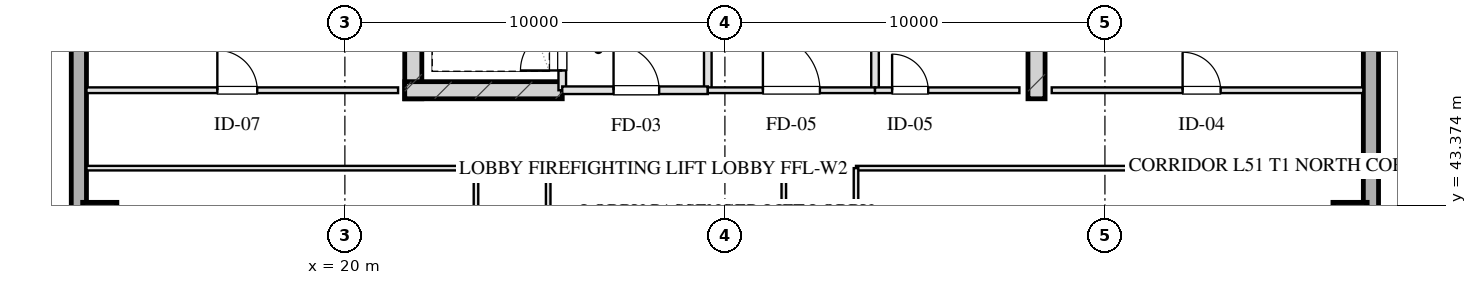
"""IFC4 building model, lengths in metres.
Left out: names, types, materials, properties, quantities, classifications, styles, units other than length and angle.
Written with IfcOpenShell. Run it as: python <this file> out.ifc"""

import sys

from ifc_helpers import new_model, si_unit, direction, frame, frame_2d, origin, origin_2d, place, context, subcontext, project, spatial, rectangle, hollow_rectangle, extrude, element, fill, save


model = new_model("IFC4")
c1 = context("Model", 3, precision=1e-05, world=origin(), true_north=direction((0.0, 1.0)))
c2 = subcontext(c1, "Body", "Model", "MODEL_VIEW")
j1 = project(units=[si_unit("LENGTHUNIT", "METRE"), si_unit("PLANEANGLEUNIT", "RADIAN")], contexts=[c1])
p1 = place(None, origin())
s1 = spatial("IfcSite", under=j1, at=p1, CompositionType="ELEMENT")
p2 = place(p1, origin())
s2 = spatial("IfcBuilding", under=s1, at=p2, CompositionType="ELEMENT")
p3 = place(p2, frame((0.0, 0.0, 192.05)))
s3 = spatial("IfcBuildingStorey", under=s2, at=p3, CompositionType="ELEMENT", Elevation=192.05)
for number, where, z_axis, x_axis in (
    (1, (21.8, 46.175, 0.0), (0.0, 0.0, 1.0), (0.0, 1.0, 0.0)),
    (2, (38.2, 46.175, 0.0), (0.0, 0.0, 1.0), (0.0, 1.0, 0.0)),
):
    element("IfcWall", number, at=place(p3, frame(where, z_axis=z_axis, x_axis=x_axis)), inside=s3, PredefinedType="SHEAR", context=c2, shape_type="SweptSolid", body=[
        extrude(rectangle(XDim=9.33, YDim=0.45, at=frame_2d((4.665, 0.0))), origin(), (0.0, 0.0, 1.0), 3.45),
    ])
p4 = place(p3, frame((21.575, 46.4, 0.0), z_axis=(0.0, 0.0, 1.0), x_axis=(1.0, 0.0, 0.0)))
e3 = element("IfcWall", 3, at=p4, inside=s3, PredefinedType="SHEAR", context=c2, shape_type="SweptSolid", body=[
    extrude(rectangle(XDim=4.145, YDim=0.45, at=frame_2d((2.073, 0.0))), origin(), (0.0, 0.0, 1.0), 3.45),
])
for number, where, z_axis, x_axis in (
    (4, (13.55, 43.0, 0.0), (0.0, 0.0, 1.0), (1.0, 0.0, 0.0)),
    (5, (46.45, 43.0, 0.0), (0.0, 0.0, 1.0), (1.0, 0.0, 0.0)),
):
    element("IfcColumn", number, at=place(p3, frame(where, z_axis=z_axis, x_axis=x_axis)), inside=s3, PredefinedType="COLUMN", context=c2, shape_type="SweptSolid", body=[
        extrude(hollow_rectangle(XDim=0.9, YDim=0.9, WallThickness=0.032, at=origin_2d()), origin(), (0.0, 0.0, 1.0), 3.451),
    ])
p5 = place(p3, frame((13.0, 10.8, 0.0), z_axis=(0.0, 0.0, 1.0), x_axis=(0.0, 1.0, 0.0)))
e6 = element("IfcWall", 6, at=p5, inside=s3, PredefinedType="SOLIDWALL", context=c2, shape_type="SweptSolid", body=[
    extrude(rectangle(XDim=46.4, YDim=0.4, at=frame_2d((23.2, 0.0))), origin(), (0.0, 0.0, 1.0), 2.61),
])
p6 = place(p5, frame((15.75, 0.0, 0.75)))
e7 = element("IfcOpeningElement", 7, at=p6, cuts=e6, PredefinedType="OPENING", context=c2, shape_type="SweptSolid", body=[
    extrude(rectangle(XDim=2.1, YDim=1.46, at=frame_2d((1.05, 0.73))), frame((0.0, 0.21, 0.0), z_axis=(0.0, -1.0, 0.0), x_axis=(1.0, 0.0, 0.0)), (0.0, 0.0, 1.0), 0.42),
])
p7 = place(p5, frame((19.55, 0.0, 0.75)))
e8 = element("IfcOpeningElement", 8, at=p7, cuts=e6, PredefinedType="OPENING", context=c2, shape_type="SweptSolid", body=[
    extrude(rectangle(XDim=2.1, YDim=1.46, at=frame_2d((1.05, 0.73))), frame((0.0, 0.21, 0.0), z_axis=(0.0, -1.0, 0.0), x_axis=(1.0, 0.0, 0.0)), (0.0, 0.0, 1.0), 0.42),
])
p8 = place(p5, frame((24.75, 0.0, 0.75)))
e9 = element("IfcOpeningElement", 9, at=p8, cuts=e6, PredefinedType="OPENING", context=c2, shape_type="SweptSolid", body=[
    extrude(rectangle(XDim=2.1, YDim=1.46, at=frame_2d((1.05, 0.73))), frame((0.0, 0.21, 0.0), z_axis=(0.0, -1.0, 0.0), x_axis=(1.0, 0.0, 0.0)), (0.0, 0.0, 1.0), 0.42),
])
p9 = place(p5, frame((28.55, 0.0, 0.75)))
e10 = element("IfcOpeningElement", 10, at=p9, cuts=e6, PredefinedType="OPENING", context=c2, shape_type="SweptSolid", body=[
    extrude(rectangle(XDim=2.1, YDim=1.46, at=frame_2d((1.05, 0.73))), frame((0.0, 0.21, 0.0), z_axis=(0.0, -1.0, 0.0), x_axis=(1.0, 0.0, 0.0)), (0.0, 0.0, 1.0), 0.42),
])
p10 = place(p3, frame((47.0, 57.2, 0.0), z_axis=(0.0, 0.0, 1.0), x_axis=(0.0, -1.0, 0.0)))
e11 = element("IfcWall", 11, at=p10, inside=s3, PredefinedType="SOLIDWALL", context=c2, shape_type="SweptSolid", body=[
    extrude(rectangle(XDim=46.4, YDim=0.4, at=frame_2d((23.2, 0.0))), origin(), (0.0, 0.0, 1.0), 2.61),
])
p11 = place(p10, frame((28.55, 0.0, 0.75)))
e12 = element("IfcOpeningElement", 12, at=p11, cuts=e11, PredefinedType="OPENING", context=c2, shape_type="SweptSolid", body=[
    extrude(rectangle(XDim=2.1, YDim=1.46, at=frame_2d((1.05, 0.73))), frame((0.0, 0.21, 0.0), z_axis=(0.0, -1.0, 0.0), x_axis=(1.0, 0.0, 0.0)), (0.0, 0.0, 1.0), 0.42),
])
p12 = place(p10, frame((24.75, 0.0, 0.75)))
e13 = element("IfcOpeningElement", 13, at=p12, cuts=e11, PredefinedType="OPENING", context=c2, shape_type="SweptSolid", body=[
    extrude(rectangle(XDim=2.1, YDim=1.46, at=frame_2d((1.05, 0.73))), frame((0.0, 0.21, 0.0), z_axis=(0.0, -1.0, 0.0), x_axis=(1.0, 0.0, 0.0)), (0.0, 0.0, 1.0), 0.42),
])
p13 = place(p10, frame((19.55, 0.0, 0.75)))
e14 = element("IfcOpeningElement", 14, at=p13, cuts=e11, PredefinedType="OPENING", context=c2, shape_type="SweptSolid", body=[
    extrude(rectangle(XDim=2.1, YDim=1.46, at=frame_2d((1.05, 0.73))), frame((0.0, 0.21, 0.0), z_axis=(0.0, -1.0, 0.0), x_axis=(1.0, 0.0, 0.0)), (0.0, 0.0, 1.0), 0.42),
])
p14 = place(p10, frame((15.75, 0.0, 0.75)))
e15 = element("IfcOpeningElement", 15, at=p14, cuts=e11, PredefinedType="OPENING", context=c2, shape_type="SweptSolid", body=[
    extrude(rectangle(XDim=2.1, YDim=1.46, at=frame_2d((1.05, 0.73))), frame((0.0, 0.21, 0.0), z_axis=(0.0, -1.0, 0.0), x_axis=(1.0, 0.0, 0.0)), (0.0, 0.0, 1.0), 0.42),
])
p15 = place(p3, frame((25.72, 46.4, 0.0), z_axis=(0.0, 0.0, 1.0), x_axis=(0.0, 1.0, 0.0)))
e16 = element("IfcWall", 16, at=p15, inside=s3, PredefinedType="PARTITIONING", context=c2, shape_type="SweptSolid", body=[
    extrude(rectangle(XDim=1.9, YDim=0.2, at=frame_2d((0.95, 0.0))), origin(), (0.0, 0.0, 1.0), 3.175),
])
p16 = place(p15, frame((0.52, 0.0, 0.0)))
e17 = element("IfcOpeningElement", 17, at=p16, cuts=e16, PredefinedType="OPENING", context=c2, shape_type="SweptSolid", body=[
    extrude(rectangle(XDim=1.1, YDim=2.05, at=frame_2d((0.55, 1.025))), frame((0.0, 0.11, 0.0), z_axis=(0.0, -1.0, 0.0), x_axis=(1.0, 0.0, 0.0)), (0.0, 0.0, 1.0), 0.22),
])
p17 = place(p3, frame((29.55, 46.4, 0.0), z_axis=(0.0, 0.0, 1.0), x_axis=(0.0, 1.0, 0.0)))
e18 = element("IfcWall", 18, at=p17, inside=s3, PredefinedType="PARTITIONING", context=c2, shape_type="SweptSolid", body=[
    extrude(rectangle(XDim=8.43, YDim=0.2, at=frame_2d((4.215, 0.0))), origin(), (0.0, 0.0, 1.0), 3.175),
])
p18 = place(p3, frame((25.72, 46.4, 0.0), z_axis=(0.0, 0.0, 1.0), x_axis=(1.0, 0.0, 0.0)))
e19 = element("IfcWall", 19, at=p18, inside=s3, PredefinedType="PARTITIONING", context=c2, shape_type="SweptSolid", body=[
    extrude(rectangle(XDim=3.83, YDim=0.2, at=frame_2d((1.915, 0.0))), origin(), (0.0, 0.0, 1.0), 3.175),
])
p19 = place(p18, frame((1.35, 0.0, 0.0)))
e20 = element("IfcOpeningElement", 20, at=p19, cuts=e19, PredefinedType="OPENING", context=c2, shape_type="SweptSolid", body=[
    extrude(rectangle(XDim=1.2, YDim=2.05, at=frame_2d((0.6, 1.025))), frame((0.0, 0.11, 0.0), z_axis=(0.0, -1.0, 0.0), x_axis=(1.0, 0.0, 0.0)), (0.0, 0.0, 1.0), 0.22),
])
p20 = place(p3, frame((33.95, 46.4, 0.0), z_axis=(0.0, 0.0, 1.0), x_axis=(0.0, 1.0, 0.0)))
e21 = element("IfcWall", 21, at=p20, inside=s3, PredefinedType="PARTITIONING", context=c2, shape_type="SweptSolid", body=[
    extrude(rectangle(XDim=8.43, YDim=0.2, at=frame_2d((4.215, 0.0))), origin(), (0.0, 0.0, 1.0), 3.175),
])
p21 = place(p3, frame((29.55, 46.4, 0.0), z_axis=(0.0, 0.0, 1.0), x_axis=(1.0, 0.0, 0.0)))
e22 = element("IfcWall", 22, at=p21, inside=s3, PredefinedType="PARTITIONING", context=c2, shape_type="SweptSolid", body=[
    extrude(rectangle(XDim=4.4, YDim=0.15, at=frame_2d((2.2, 0.0))), origin(), (0.0, 0.0, 1.0), 3.175),
])
p22 = place(p21, frame((1.45, 0.0, 0.0)))
e23 = element("IfcOpeningElement", 23, at=p22, cuts=e22, PredefinedType="OPENING", context=c2, shape_type="SweptSolid", body=[
    extrude(rectangle(XDim=1.5, YDim=2.05, at=frame_2d((0.75, 1.025))), frame((0.0, 0.085, 0.0), z_axis=(0.0, -1.0, 0.0), x_axis=(1.0, 0.0, 0.0)), (0.0, 0.0, 1.0), 0.17),
])
p23 = place(p3, frame((33.95, 46.4, 0.0), z_axis=(0.0, 0.0, 1.0), x_axis=(1.0, 0.0, 0.0)))
e24 = element("IfcWall", 24, at=p23, inside=s3, PredefinedType="PARTITIONING", context=c2, shape_type="SweptSolid", body=[
    extrude(rectangle(XDim=3.8, YDim=0.15, at=frame_2d((1.9, 0.0))), origin(), (0.0, 0.0, 1.0), 3.175),
])
p24 = place(p23, frame((0.45, 0.0, 0.0)))
e25 = element("IfcOpeningElement", 25, at=p24, cuts=e24, PredefinedType="OPENING", context=c2, shape_type="SweptSolid", body=[
    extrude(rectangle(XDim=0.95, YDim=2.05, at=frame_2d((0.475, 1.025))), frame((0.0, 0.085, 0.0), z_axis=(0.0, -1.0, 0.0), x_axis=(1.0, 0.0, 0.0)), (0.0, 0.0, 1.0), 0.17),
])
p25 = place(p3, frame((13.2, 46.4, 0.0), z_axis=(0.0, 0.0, 1.0), x_axis=(1.0, 0.0, 0.0)))
e26 = element("IfcWall", 26, at=p25, inside=s3, PredefinedType="PARTITIONING", context=c2, shape_type="SweptSolid", body=[
    extrude(rectangle(XDim=8.2, YDim=0.15, at=frame_2d((4.1, 0.0))), origin(), (0.0, 0.0, 1.0), 3.175),
])
p26 = place(p25, frame((3.444, 0.0, 0.0)))
e27 = element("IfcOpeningElement", 27, at=p26, cuts=e26, PredefinedType="OPENING", context=c2, shape_type="SweptSolid", body=[
    extrude(rectangle(XDim=1.05, YDim=2.05, at=frame_2d((0.525, 1.025))), frame((0.0, 0.085, 0.0), z_axis=(0.0, -1.0, 0.0), x_axis=(1.0, 0.0, 0.0)), (0.0, 0.0, 1.0), 0.17),
])
p27 = place(p3, frame((38.6, 46.4, 0.0), z_axis=(0.0, 0.0, 1.0), x_axis=(1.0, 0.0, 0.0)))
e28 = element("IfcWall", 28, at=p27, inside=s3, PredefinedType="PARTITIONING", context=c2, shape_type="SweptSolid", body=[
    extrude(rectangle(XDim=8.2, YDim=0.15, at=frame_2d((4.1, 0.0))), origin(), (0.0, 0.0, 1.0), 3.175),
])
p28 = place(p27, frame((3.444, 0.0, 0.0)))
e29 = element("IfcOpeningElement", 29, at=p28, cuts=e28, PredefinedType="OPENING", context=c2, shape_type="SweptSolid", body=[
    extrude(rectangle(XDim=1.0, YDim=2.05, at=frame_2d((0.5, 1.025))), frame((0.0, 0.085, 0.0), z_axis=(0.0, -1.0, 0.0), x_axis=(1.0, 0.0, 0.0)), (0.0, 0.0, 1.0), 0.17),
])
p29 = place(p3, frame((13.2, 44.35, 0.0), z_axis=(0.0, 0.0, 1.0), x_axis=(1.0, 0.0, 0.0)))
e30 = element("IfcWall", 30, at=p29, inside=s3, PredefinedType="PARTITIONING", context=c2, shape_type="SweptSolid", body=[
    extrude(rectangle(XDim=10.25, YDim=0.12, at=frame_2d((5.125, 0.0))), origin(), (0.0, 0.0, 1.0), 3.175),
])
p30 = place(p3, frame((25.35, 44.35, 0.0), z_axis=(0.0, 0.0, 1.0), x_axis=(1.0, 0.0, 0.0)))
e31 = element("IfcWall", 31, at=p30, inside=s3, PredefinedType="PARTITIONING", context=c2, shape_type="SweptSolid", body=[
    extrude(rectangle(XDim=6.2, YDim=0.12, at=frame_2d((3.1, 0.0))), origin(), (0.0, 0.0, 1.0), 3.175),
])
p31 = place(p3, frame((33.45, 44.35, 0.0), z_axis=(0.0, 0.0, 1.0), x_axis=(1.0, 0.0, 0.0)))
e32 = element("IfcWall", 32, at=p31, inside=s3, PredefinedType="PARTITIONING", context=c2, shape_type="SweptSolid", body=[
    extrude(rectangle(XDim=13.35, YDim=0.12, at=frame_2d((6.675, 0.0))), origin(), (0.0, 0.0, 1.0), 3.175),
])
p32 = place(p3, frame((23.45, 23.65, 0.0), z_axis=(0.0, 0.0, 1.0), x_axis=(0.0, 1.0, 0.0)))
e33 = element("IfcWall", 33, at=p32, inside=s3, PredefinedType="PARTITIONING", context=c2, shape_type="SweptSolid", body=[
    extrude(rectangle(XDim=20.7, YDim=0.12, at=frame_2d((10.35, 0.0))), origin(), (0.0, 0.0, 1.0), 3.175),
])
p33 = place(p32, frame((2.175, 0.0, 0.0)))
e34 = element("IfcOpeningElement", 34, at=p33, cuts=e33, PredefinedType="OPENING", context=c2, shape_type="SweptSolid", body=[
    extrude(rectangle(XDim=1.0, YDim=2.05, at=frame_2d((0.5, 1.025))), frame((0.0, 0.07, 0.0), z_axis=(0.0, -1.0, 0.0), x_axis=(1.0, 0.0, 0.0)), (0.0, 0.0, 1.0), 0.14),
])
p34 = place(p32, frame((6.883, 0.0, 0.0)))
e35 = element("IfcOpeningElement", 35, at=p34, cuts=e33, PredefinedType="OPENING", context=c2, shape_type="SweptSolid", body=[
    extrude(rectangle(XDim=1.0, YDim=2.05, at=frame_2d((0.5, 1.025))), frame((0.0, 0.07, 0.0), z_axis=(0.0, -1.0, 0.0), x_axis=(1.0, 0.0, 0.0)), (0.0, 0.0, 1.0), 0.14),
])
p35 = place(p32, frame((11.502, 0.0, 0.0)))
e36 = element("IfcOpeningElement", 36, at=p35, cuts=e33, PredefinedType="OPENING", context=c2, shape_type="SweptSolid", body=[
    extrude(rectangle(XDim=1.0, YDim=2.05, at=frame_2d((0.5, 1.025))), frame((0.0, 0.07, 0.0), z_axis=(0.0, -1.0, 0.0), x_axis=(1.0, 0.0, 0.0)), (0.0, 0.0, 1.0), 0.14),
])
p36 = place(p32, frame((17.145, 0.0, 0.0)))
e37 = element("IfcOpeningElement", 37, at=p36, cuts=e33, PredefinedType="OPENING", context=c2, shape_type="SweptSolid", body=[
    extrude(rectangle(XDim=1.0, YDim=2.05, at=frame_2d((0.5, 1.025))), frame((0.0, 0.07, 0.0), z_axis=(0.0, -1.0, 0.0), x_axis=(1.0, 0.0, 0.0)), (0.0, 0.0, 1.0), 0.14),
])
p37 = place(p3, frame((25.35, 23.65, 0.0), z_axis=(0.0, 0.0, 1.0), x_axis=(0.0, 1.0, 0.0)))
e38 = element("IfcWall", 38, at=p37, inside=s3, PredefinedType="PARTITIONING", context=c2, shape_type="SweptSolid", body=[
    extrude(rectangle(XDim=20.7, YDim=0.12, at=frame_2d((10.35, 0.0))), origin(), (0.0, 0.0, 1.0), 3.175),
])
p38 = place(p37, frame((4.963, 0.0, 0.0)))
e39 = element("IfcOpeningElement", 39, at=p38, cuts=e38, PredefinedType="OPENING", context=c2, shape_type="SweptSolid", body=[
    extrude(rectangle(XDim=1.1, YDim=2.05, at=frame_2d((0.55, 1.025))), frame((0.0, 0.07, 0.0), z_axis=(0.0, -1.0, 0.0), x_axis=(1.0, 0.0, 0.0)), (0.0, 0.0, 1.0), 0.14),
])
p39 = place(p37, frame((15.382, 0.0, 0.0)))
e40 = element("IfcOpeningElement", 40, at=p39, cuts=e38, PredefinedType="OPENING", context=c2, shape_type="SweptSolid", body=[
    extrude(rectangle(XDim=1.1, YDim=2.05, at=frame_2d((0.55, 1.025))), frame((0.0, 0.07, 0.0), z_axis=(0.0, -1.0, 0.0), x_axis=(1.0, 0.0, 0.0)), (0.0, 0.0, 1.0), 0.14),
])
p40 = place(p3, frame((31.55, 23.65, 0.0), z_axis=(0.0, 0.0, 1.0), x_axis=(0.0, 1.0, 0.0)))
e41 = element("IfcWall", 41, at=p40, inside=s3, PredefinedType="PARTITIONING", context=c2, shape_type="SweptSolid", body=[
    extrude(rectangle(XDim=20.7, YDim=0.12, at=frame_2d((10.35, 0.0))), origin(), (0.0, 0.0, 1.0), 3.175),
])
p41 = place(p3, frame((33.45, 23.65, 0.0), z_axis=(0.0, 0.0, 1.0), x_axis=(0.0, 1.0, 0.0)))
e42 = element("IfcWall", 42, at=p41, inside=s3, PredefinedType="PARTITIONING", context=c2, shape_type="SweptSolid", body=[
    extrude(rectangle(XDim=20.7, YDim=0.12, at=frame_2d((10.35, 0.0))), origin(), (0.0, 0.0, 1.0), 3.175),
])
p42 = place(p41, frame((0.775, 0.0, 0.0)))
e43 = element("IfcOpeningElement", 43, at=p42, cuts=e42, PredefinedType="OPENING", context=c2, shape_type="SweptSolid", body=[
    extrude(rectangle(XDim=1.0, YDim=2.05, at=frame_2d((0.5, 1.025))), frame((0.0, 0.07, 0.0), z_axis=(0.0, -1.0, 0.0), x_axis=(1.0, 0.0, 0.0)), (0.0, 0.0, 1.0), 0.14),
])
p43 = place(p41, frame((5.35, 0.0, 0.0)))
e44 = element("IfcOpeningElement", 44, at=p43, cuts=e42, PredefinedType="OPENING", context=c2, shape_type="SweptSolid", body=[
    extrude(rectangle(XDim=1.0, YDim=2.05, at=frame_2d((0.5, 1.025))), frame((0.0, 0.07, 0.0), z_axis=(0.0, -1.0, 0.0), x_axis=(1.0, 0.0, 0.0)), (0.0, 0.0, 1.0), 0.14),
])
p44 = place(p41, frame((9.85, 0.0, 0.0)))
e45 = element("IfcOpeningElement", 45, at=p44, cuts=e42, PredefinedType="OPENING", context=c2, shape_type="SweptSolid", body=[
    extrude(rectangle(XDim=1.0, YDim=2.05, at=frame_2d((0.5, 1.025))), frame((0.0, 0.07, 0.0), z_axis=(0.0, -1.0, 0.0), x_axis=(1.0, 0.0, 0.0)), (0.0, 0.0, 1.0), 0.14),
])
p45 = place(p41, frame((12.95, 0.0, 0.0)))
e46 = element("IfcOpeningElement", 46, at=p45, cuts=e42, PredefinedType="OPENING", context=c2, shape_type="SweptSolid", body=[
    extrude(rectangle(XDim=1.0, YDim=2.05, at=frame_2d((0.5, 1.025))), frame((0.0, 0.07, 0.0), z_axis=(0.0, -1.0, 0.0), x_axis=(1.0, 0.0, 0.0)), (0.0, 0.0, 1.0), 0.14),
])
p46 = place(p41, frame((17.525, 0.0, 0.0)))
e47 = element("IfcOpeningElement", 47, at=p46, cuts=e42, PredefinedType="OPENING", context=c2, shape_type="SweptSolid", body=[
    extrude(rectangle(XDim=1.0, YDim=2.05, at=frame_2d((0.5, 1.025))), frame((0.0, 0.07, 0.0), z_axis=(0.0, -1.0, 0.0), x_axis=(1.0, 0.0, 0.0)), (0.0, 0.0, 1.0), 0.14),
])
p47 = place(p16, origin())
e48 = element("IfcDoor", 48, at=p47, inside=s3, OperationType="SINGLE_SWING_LEFT", PredefinedType="DOOR", context=c2, shape_type="SweptSolid", body=[
    extrude(rectangle(XDim=1.1, YDim=2.05, at=frame_2d((0.55, 1.025))), frame((0.0, 0.025, 0.0), z_axis=(0.0, -1.0, 0.0), x_axis=(1.0, 0.0, 0.0)), (0.0, 0.0, 1.0), 0.05),
])
fill(e17, e48)
p48 = place(p19, origin())
e49 = element("IfcDoor", 49, at=p48, inside=s3, OperationType="SINGLE_SWING_LEFT", PredefinedType="DOOR", context=c2, shape_type="SweptSolid", body=[
    extrude(rectangle(XDim=1.2, YDim=2.05, at=frame_2d((0.6, 1.025))), frame((0.0, 0.025, 0.0), z_axis=(0.0, -1.0, 0.0), x_axis=(1.0, 0.0, 0.0)), (0.0, 0.0, 1.0), 0.05),
])
fill(e20, e49)
p49 = place(p22, origin())
e50 = element("IfcDoor", 50, at=p49, inside=s3, OperationType="SINGLE_SWING_LEFT", PredefinedType="DOOR", context=c2, shape_type="SweptSolid", body=[
    extrude(rectangle(XDim=1.5, YDim=2.05, at=frame_2d((0.75, 1.025))), frame((0.0, 0.025, 0.0), z_axis=(0.0, -1.0, 0.0), x_axis=(1.0, 0.0, 0.0)), (0.0, 0.0, 1.0), 0.05),
])
fill(e23, e50)
p50 = place(p24, origin())
e51 = element("IfcDoor", 51, at=p50, inside=s3, OperationType="SINGLE_SWING_LEFT", PredefinedType="DOOR", context=c2, shape_type="SweptSolid", body=[
    extrude(rectangle(XDim=0.95, YDim=2.05, at=frame_2d((0.475, 1.025))), frame((0.0, 0.025, 0.0), z_axis=(0.0, -1.0, 0.0), x_axis=(1.0, 0.0, 0.0)), (0.0, 0.0, 1.0), 0.05),
])
fill(e25, e51)
p51 = place(p26, origin())
e52 = element("IfcDoor", 52, at=p51, inside=s3, OperationType="SINGLE_SWING_LEFT", PredefinedType="DOOR", context=c2, shape_type="SweptSolid", body=[
    extrude(rectangle(XDim=1.05, YDim=2.05, at=frame_2d((0.525, 1.025))), frame((0.0, 0.025, 0.0), z_axis=(0.0, -1.0, 0.0), x_axis=(1.0, 0.0, 0.0)), (0.0, 0.0, 1.0), 0.05),
])
fill(e27, e52)
p52 = place(p28, origin())
e53 = element("IfcDoor", 53, at=p52, inside=s3, OperationType="SINGLE_SWING_LEFT", PredefinedType="DOOR", context=c2, shape_type="SweptSolid", body=[
    extrude(rectangle(XDim=1.0, YDim=2.05, at=frame_2d((0.5, 1.025))), frame((0.0, 0.025, 0.0), z_axis=(0.0, -1.0, 0.0), x_axis=(1.0, 0.0, 0.0)), (0.0, 0.0, 1.0), 0.05),
])
fill(e29, e53)
save(model, sys.argv[1])
